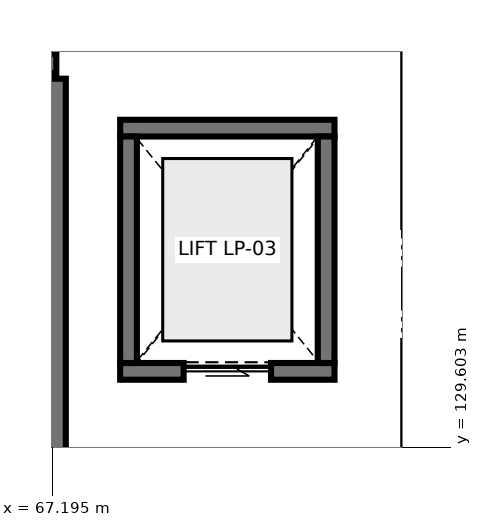
"""IFC4 building model, lengths in metres.
Left out: names, types, materials, properties, quantities, classifications, styles, units other than length and angle.
Written with IfcOpenShell. Run it as: python <this file> out.ifc"""

import sys

from ifc_helpers import new_model, si_unit, direction, frame, frame_2d, origin, place, context, subcontext, project, spatial, rectangle, extrude, element, fill, save


model = new_model("IFC4")
c1 = context("Model", 3, precision=1e-05, world=origin(), true_north=direction((0.0, 1.0)))
c2 = subcontext(c1, "Body", "Model", "MODEL_VIEW")
j1 = project(units=[si_unit("LENGTHUNIT", "METRE"), si_unit("PLANEANGLEUNIT", "RADIAN")], contexts=[c1])
p1 = place(None, origin())
s1 = spatial("IfcSite", under=j1, at=p1, CompositionType="ELEMENT")
p2 = place(p1, origin())
s2 = spatial("IfcBuilding", under=s1, at=p2, CompositionType="ELEMENT")
p3 = place(p2, frame((0.0, 0.0, 15.0)))
s3 = spatial("IfcBuildingStorey", under=s2, at=p3, CompositionType="ELEMENT", Elevation=15.0)
p4 = place(p3, frame((58.95, 134.65, 0.0), z_axis=(0.0, 0.0, 1.0), x_axis=(1.0, 0.0, 0.0)))
e1 = element("IfcWall", 1, at=p4, inside=s3, PredefinedType="SHEAR", context=c2, shape_type="SweptSolid", body=[
    extrude(rectangle(XDim=8.3, YDim=0.25, at=frame_2d((4.15, 0.0))), origin(), (0.0, 0.0, 1.0), 4.21),
])
p5 = place(p3, frame((67.25, 134.45, 0.0), z_axis=(0.0, 0.0, 1.0), x_axis=(0.0, -1.0, 0.0)))
e2 = element("IfcWall", 2, at=p5, inside=s3, PredefinedType="SHEAR", context=c2, shape_type="SweptSolid", body=[
    extrude(rectangle(XDim=5.3, YDim=0.25, at=frame_2d((2.65, 0.0))), origin(), (0.0, 0.0, 1.0), 4.21),
])
p6 = place(p3, frame((68.09, 130.6, 0.0), z_axis=(0.0, 0.0, 1.0), x_axis=(1.0, 0.0, 0.0)))
e3 = element("IfcWall", 3, at=p6, inside=s3, PredefinedType="SHEAR", context=c2, shape_type="SweptSolid", body=[
    extrude(rectangle(XDim=2.82, YDim=0.22, at=frame_2d((1.41, 0.0))), origin(), (0.0, 0.0, 1.0), 4.21),
])
p7 = place(p6, frame((0.835, 0.0, 0.0)))
e4 = element("IfcOpeningElement", 4, at=p7, cuts=e3, PredefinedType="OPENING", context=c2, shape_type="SweptSolid", body=[
    extrude(rectangle(XDim=1.15, YDim=2.2, at=frame_2d((0.575, 1.1))), frame((0.0, 0.12, 0.0), z_axis=(0.0, -1.0, 0.0), x_axis=(1.0, 0.0, 0.0)), (0.0, 0.0, 1.0), 0.24),
])
p8 = place(p3, frame((68.09, 133.8, 0.0), z_axis=(0.0, 0.0, 1.0), x_axis=(1.0, 0.0, 0.0)))
e5 = element("IfcWall", 5, at=p8, inside=s3, PredefinedType="SHEAR", context=c2, shape_type="SweptSolid", body=[
    extrude(rectangle(XDim=2.82, YDim=0.22, at=frame_2d((1.41, 0.0))), origin(), (0.0, 0.0, 1.0), 4.21),
])
for number, where, z_axis, x_axis in (
    (6, (68.2, 130.71, 0.0), (0.0, 0.0, 1.0), (0.0, 1.0, 0.0)),
    (7, (70.8, 130.71, 0.0), (0.0, 0.0, 1.0), (0.0, 1.0, 0.0)),
):
    element("IfcWall", number, at=place(p3, frame(where, z_axis=z_axis, x_axis=x_axis)), inside=s3, PredefinedType="SHEAR", context=c2, shape_type="SweptSolid", body=[
        extrude(rectangle(XDim=2.98, YDim=0.22, at=frame_2d((1.49, 0.0))), origin(), (0.0, 0.0, 1.0), 4.21),
    ])
p9 = place(p7, origin())
e8 = element("IfcDoor", 8, at=p9, inside=s3, OperationType="SLIDING_TO_LEFT", PredefinedType="DOOR", context=c2, shape_type="SweptSolid", body=[
    extrude(rectangle(XDim=1.15, YDim=2.2, at=frame_2d((0.575, 1.1))), frame((0.0, 0.025, 0.0), z_axis=(0.0, -1.0, 0.0), x_axis=(1.0, 0.0, 0.0)), (0.0, 0.0, 1.0), 0.05),
])
fill(e4, e8)
save(model, sys.argv[1])
